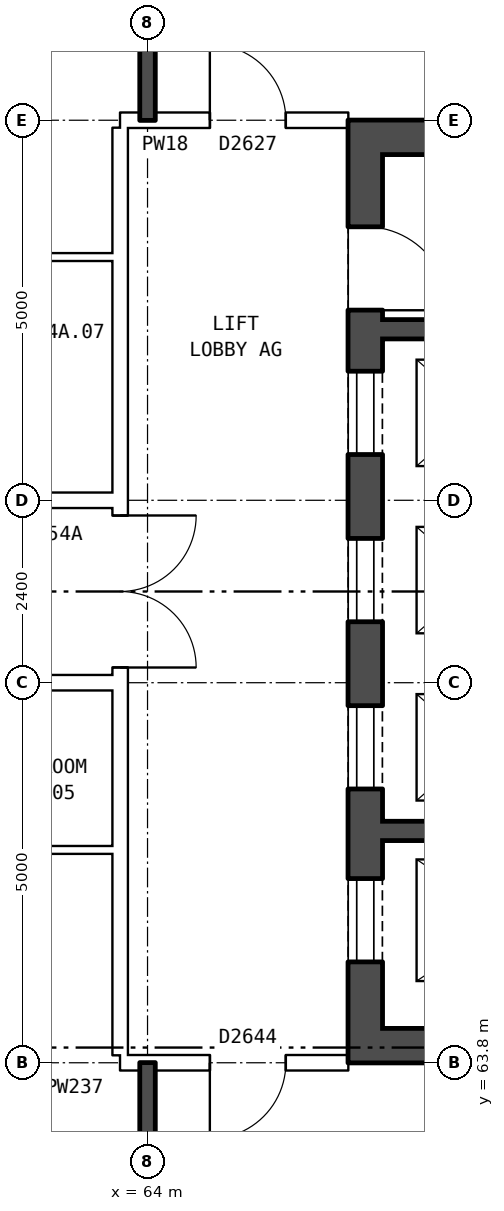
"""IFC4 building model, lengths in metres.
Left out: names, types, materials, properties, quantities, classifications, styles, units other than length and angle.
Written with IfcOpenShell. Run it as: python <this file> out.ifc"""

import sys

from ifc_helpers import new_model, si_unit, direction, frame, frame_2d, origin, place, context, subcontext, project, spatial, rectangle, extrude, element, fill, save


model = new_model("IFC4")
c1 = context("Model", 3, precision=1e-05, world=origin(), true_north=direction((0.0, 1.0)))
c2 = subcontext(c1, "Body", "Model", "MODEL_VIEW")
j1 = project(units=[si_unit("LENGTHUNIT", "METRE"), si_unit("PLANEANGLEUNIT", "RADIAN")], contexts=[c1])
p1 = place(None, origin())
s1 = spatial("IfcSite", under=j1, at=p1, CompositionType="ELEMENT")
p2 = place(p1, origin())
s2 = spatial("IfcBuilding", under=s1, at=p2, CompositionType="ELEMENT")
p3 = place(p2, frame((0.0, 0.0, 191.3)))
s3 = spatial("IfcBuildingStorey", under=s2, at=p3, CompositionType="ELEMENT", Elevation=191.3)
p4 = place(p3, frame((66.865, 63.8, 0.0), z_axis=(0.0, 0.0, 1.0), x_axis=(0.0, 1.0, 0.0)))
e1 = element("IfcWall", 1, at=p4, inside=s3, PredefinedType="SHEAR", context=c2, shape_type="SweptSolid", body=[
    extrude(rectangle(XDim=12.4, YDim=0.45, at=frame_2d((6.2, 0.0))), origin(), (0.0, 0.0, 1.0), 2.85),
])
p5 = place(p4, frame((1.325, 0.0, 0.0)))
e2 = element("IfcOpeningElement", 2, at=p5, cuts=e1, PredefinedType="OPENING", context=c2, shape_type="SweptSolid", body=[
    extrude(rectangle(XDim=1.1, YDim=2.1, at=frame_2d((0.55, 1.05))), frame((0.0, 0.235, 0.0), z_axis=(0.0, -1.0, 0.0), x_axis=(1.0, 0.0, 0.0)), (0.0, 0.0, 1.0), 0.47),
])
p6 = place(p4, frame((3.6, 0.0, 0.0)))
e3 = element("IfcOpeningElement", 3, at=p6, cuts=e1, PredefinedType="OPENING", context=c2, shape_type="SweptSolid", body=[
    extrude(rectangle(XDim=1.1, YDim=2.1, at=frame_2d((0.55, 1.05))), frame((0.0, 0.235, 0.0), z_axis=(0.0, -1.0, 0.0), x_axis=(1.0, 0.0, 0.0)), (0.0, 0.0, 1.0), 0.47),
])
p7 = place(p4, frame((5.8, 0.0, 0.0)))
e4 = element("IfcOpeningElement", 4, at=p7, cuts=e1, PredefinedType="OPENING", context=c2, shape_type="SweptSolid", body=[
    extrude(rectangle(XDim=1.1, YDim=2.1, at=frame_2d((0.55, 1.05))), frame((0.0, 0.235, 0.0), z_axis=(0.0, -1.0, 0.0), x_axis=(1.0, 0.0, 0.0)), (0.0, 0.0, 1.0), 0.47),
])
p8 = place(p4, frame((8.0, 0.0, 0.0)))
e5 = element("IfcOpeningElement", 5, at=p8, cuts=e1, PredefinedType="OPENING", context=c2, shape_type="SweptSolid", body=[
    extrude(rectangle(XDim=1.1, YDim=2.1, at=frame_2d((0.55, 1.05))), frame((0.0, 0.235, 0.0), z_axis=(0.0, -1.0, 0.0), x_axis=(1.0, 0.0, 0.0)), (0.0, 0.0, 1.0), 0.47),
])
p9 = place(p4, frame((9.9, 0.0, 0.0)))
e6 = element("IfcOpeningElement", 6, at=p9, cuts=e1, PredefinedType="OPENING", context=c2, shape_type="SweptSolid", body=[
    extrude(rectangle(XDim=1.1, YDim=2.1, at=frame_2d((0.55, 1.05))), frame((0.0, 0.235, 0.0), z_axis=(0.0, -1.0, 0.0), x_axis=(1.0, 0.0, 0.0)), (0.0, 0.0, 1.0), 0.47),
])
for number, where, z_axis, x_axis in (
    (7, (67.09, 64.025, 0.0), (0.0, 0.0, 1.0), (1.0, 0.0, 0.0)),
    (8, (67.09, 75.975, 0.0), (0.0, 0.0, 1.0), (1.0, 0.0, 0.0)),
):
    element("IfcWall", number, at=place(p3, frame(where, z_axis=z_axis, x_axis=x_axis)), inside=s3, PredefinedType="SHEAR", context=c2, shape_type="SweptSolid", body=[
        extrude(rectangle(XDim=8.1, YDim=0.45, at=frame_2d((4.05, 0.0))), origin(), (0.0, 0.0, 1.0), 2.85),
    ])
p10 = place(p3, frame((67.09, 66.85, 0.0), z_axis=(0.0, 0.0, 1.0), x_axis=(1.0, 0.0, 0.0)))
e9 = element("IfcWall", 9, at=p10, inside=s3, PredefinedType="SHEAR", context=c2, shape_type="SweptSolid", body=[
    extrude(rectangle(XDim=3.545, YDim=0.25, at=frame_2d((1.772, 0.0))), origin(), (0.0, 0.0, 1.0), 2.85),
])
p11 = place(p3, frame((67.09, 73.45, 0.0), z_axis=(0.0, 0.0, 1.0), x_axis=(1.0, 0.0, 0.0)))
e10 = element("IfcWall", 10, at=p11, inside=s3, PredefinedType="SHEAR", context=c2, shape_type="SweptSolid", body=[
    extrude(rectangle(XDim=2.475, YDim=0.25, at=frame_2d((1.237, 0.0))), origin(), (0.0, 0.0, 1.0), 2.85),
])
p12 = place(p3, frame((63.64, 63.9, 0.0), z_axis=(0.0, 0.0, 1.0), x_axis=(0.0, 1.0, 0.0)))
e11 = element("IfcWall", 11, at=p12, inside=s3, PredefinedType="PARTITIONING", context=c2, shape_type="SweptSolid", body=[
    extrude(rectangle(XDim=12.2, YDim=0.2, at=frame_2d((6.1, 0.0))), origin(), (0.0, 0.0, 1.0), 2.85),
])
p13 = place(p12, frame((5.1, 0.0, 0.0)))
e12 = element("IfcOpeningElement", 12, at=p13, cuts=e11, PredefinedType="OPENING", context=c2, shape_type="SweptSolid", body=[
    extrude(rectangle(XDim=2.0, YDim=2.1, at=frame_2d((1.0, 1.05))), frame((0.0, 0.11, 0.0), z_axis=(0.0, -1.0, 0.0), x_axis=(1.0, 0.0, 0.0)), (0.0, 0.0, 1.0), 0.22),
])
p14 = place(p3, frame((63.64, 63.8, 0.0), z_axis=(0.0, 0.0, 1.0), x_axis=(1.0, 0.0, 0.0)))
e13 = element("IfcWall", 13, at=p14, inside=s3, PredefinedType="PARTITIONING", context=c2, shape_type="SweptSolid", body=[
    extrude(rectangle(XDim=3.0, YDim=0.2, at=frame_2d((1.5, 0.0))), origin(), (0.0, 0.0, 1.0), 2.85),
])
p15 = place(p14, frame((1.18, 0.0, 0.0)))
e14 = element("IfcOpeningElement", 14, at=p15, cuts=e13, PredefinedType="OPENING", context=c2, shape_type="SweptSolid", body=[
    extrude(rectangle(XDim=1.0, YDim=2.1, at=frame_2d((0.5, 1.05))), frame((0.0, 0.11, 0.0), z_axis=(0.0, -1.0, 0.0), x_axis=(1.0, 0.0, 0.0)), (0.0, 0.0, 1.0), 0.22),
])
p16 = place(p3, frame((61.0, 66.6, 0.0), z_axis=(0.0, 0.0, 1.0), x_axis=(1.0, 0.0, 0.0)))
e15 = element("IfcWall", 15, at=p16, inside=s3, PredefinedType="PARTITIONING", context=c2, shape_type="SweptSolid", body=[
    extrude(rectangle(XDim=2.64, YDim=0.1, at=frame_2d((1.32, 0.0))), origin(), (0.0, 0.0, 1.0), 2.85),
])
p17 = place(p3, frame((44.36, 68.8, 0.0), z_axis=(0.0, 0.0, 1.0), x_axis=(1.0, 0.0, 0.0)))
e16 = element("IfcWall", 16, at=p17, inside=s3, PredefinedType="PARTITIONING", context=c2, shape_type="SweptSolid", body=[
    extrude(rectangle(XDim=19.28, YDim=0.2, at=frame_2d((9.64, 0.0))), origin(), (0.0, 0.0, 1.0), 2.85),
])
p18 = place(p17, frame((14.64, 0.0, 0.0)))
e17 = element("IfcOpeningElement", 17, at=p18, cuts=e16, PredefinedType="OPENING", context=c2, shape_type="SweptSolid", body=[
    extrude(rectangle(XDim=1.0, YDim=2.1, at=frame_2d((0.5, 1.05))), frame((0.0, 0.11, 0.0), z_axis=(0.0, -1.0, 0.0), x_axis=(1.0, 0.0, 0.0)), (0.0, 0.0, 1.0), 0.22),
])
p19 = place(p17, frame((5.64, 0.0, 0.0)))
e18 = element("IfcOpeningElement", 18, at=p19, cuts=e16, PredefinedType="OPENING", context=c2, shape_type="SweptSolid", body=[
    extrude(rectangle(XDim=1.0, YDim=2.1, at=frame_2d((0.5, 1.05))), frame((0.0, 0.11, 0.0), z_axis=(0.0, -1.0, 0.0), x_axis=(1.0, 0.0, 0.0)), (0.0, 0.0, 1.0), 0.22),
])
p20 = place(p3, frame((44.36, 71.2, 0.0), z_axis=(0.0, 0.0, 1.0), x_axis=(1.0, 0.0, 0.0)))
e19 = element("IfcWall", 19, at=p20, inside=s3, PredefinedType="PARTITIONING", context=c2, shape_type="SweptSolid", body=[
    extrude(rectangle(XDim=19.28, YDim=0.2, at=frame_2d((9.64, 0.0))), origin(), (0.0, 0.0, 1.0), 2.85),
])
p21 = place(p20, frame((14.64, 0.0, 0.0)))
e20 = element("IfcOpeningElement", 20, at=p21, cuts=e19, PredefinedType="OPENING", context=c2, shape_type="SweptSolid", body=[
    extrude(rectangle(XDim=1.0, YDim=2.1, at=frame_2d((0.5, 1.05))), frame((0.0, 0.11, 0.0), z_axis=(0.0, -1.0, 0.0), x_axis=(1.0, 0.0, 0.0)), (0.0, 0.0, 1.0), 0.22),
])
p22 = place(p20, frame((5.64, 0.0, 0.0)))
e21 = element("IfcOpeningElement", 21, at=p22, cuts=e19, PredefinedType="OPENING", context=c2, shape_type="SweptSolid", body=[
    extrude(rectangle(XDim=1.0, YDim=2.1, at=frame_2d((0.5, 1.05))), frame((0.0, 0.11, 0.0), z_axis=(0.0, -1.0, 0.0), x_axis=(1.0, 0.0, 0.0)), (0.0, 0.0, 1.0), 0.22),
])
p23 = place(p3, frame((61.0, 74.4, 0.0), z_axis=(0.0, 0.0, 1.0), x_axis=(1.0, 0.0, 0.0)))
e22 = element("IfcWall", 22, at=p23, inside=s3, PredefinedType="PARTITIONING", context=c2, shape_type="SweptSolid", body=[
    extrude(rectangle(XDim=2.64, YDim=0.1, at=frame_2d((1.32, 0.0))), origin(), (0.0, 0.0, 1.0), 2.85),
])
p24 = place(p3, frame((63.64, 76.2, 0.0), z_axis=(0.0, 0.0, 1.0), x_axis=(1.0, 0.0, 0.0)))
e23 = element("IfcWall", 23, at=p24, inside=s3, PredefinedType="PARTITIONING", context=c2, shape_type="SweptSolid", body=[
    extrude(rectangle(XDim=3.0, YDim=0.2, at=frame_2d((1.5, 0.0))), origin(), (0.0, 0.0, 1.0), 2.85),
])
p25 = place(p24, frame((1.18, 0.0, 0.0)))
e24 = element("IfcOpeningElement", 24, at=p25, cuts=e23, PredefinedType="OPENING", context=c2, shape_type="SweptSolid", body=[
    extrude(rectangle(XDim=1.0, YDim=2.1, at=frame_2d((0.5, 1.05))), frame((0.0, 0.11, 0.0), z_axis=(0.0, -1.0, 0.0), x_axis=(1.0, 0.0, 0.0)), (0.0, 0.0, 1.0), 0.22),
])
for number, where, z_axis, x_axis in (
    (25, (64.0, 54.36, 0.0), (0.0, 0.0, 1.0), (0.0, 1.0, 0.0)),
    (26, (64.0, 76.2, 0.0), (0.0, 0.0, 1.0), (0.0, 1.0, 0.0)),
):
    element("IfcWall", number, at=place(p3, frame(where, z_axis=z_axis, x_axis=x_axis)), inside=s3, PredefinedType="SOLIDWALL", context=c2, shape_type="SweptSolid", body=[
        extrude(rectangle(XDim=9.44, YDim=0.2, at=frame_2d((4.72, 0.0))), origin(), (0.0, 0.0, 1.0), 2.85),
    ])
p26 = place(p5, origin())
e27 = element("IfcDoor", 27, at=p26, inside=s3, OperationType="DOUBLE_DOOR_SLIDING", PredefinedType="DOOR", context=c2, shape_type="SweptSolid", body=[
    extrude(rectangle(XDim=1.1, YDim=2.1, at=frame_2d((0.55, 1.05))), frame((0.0, -0.16, 0.0), z_axis=(0.0, -1.0, 0.0), x_axis=(1.0, 0.0, 0.0)), (0.0, 0.0, 1.0), 0.05),
])
fill(e2, e27)
p27 = place(p6, origin())
e28 = element("IfcDoor", 28, at=p27, inside=s3, OperationType="DOUBLE_DOOR_SLIDING", PredefinedType="DOOR", context=c2, shape_type="SweptSolid", body=[
    extrude(rectangle(XDim=1.1, YDim=2.1, at=frame_2d((0.55, 1.05))), frame((0.0, -0.16, 0.0), z_axis=(0.0, -1.0, 0.0), x_axis=(1.0, 0.0, 0.0)), (0.0, 0.0, 1.0), 0.05),
])
fill(e3, e28)
p28 = place(p7, origin())
e29 = element("IfcDoor", 29, at=p28, inside=s3, OperationType="DOUBLE_DOOR_SLIDING", PredefinedType="DOOR", context=c2, shape_type="SweptSolid", body=[
    extrude(rectangle(XDim=1.1, YDim=2.1, at=frame_2d((0.55, 1.05))), frame((0.0, -0.16, 0.0), z_axis=(0.0, -1.0, 0.0), x_axis=(1.0, 0.0, 0.0)), (0.0, 0.0, 1.0), 0.05),
])
fill(e4, e29)
p29 = place(p8, origin())
e30 = element("IfcDoor", 30, at=p29, inside=s3, OperationType="DOUBLE_DOOR_SLIDING", PredefinedType="DOOR", context=c2, shape_type="SweptSolid", body=[
    extrude(rectangle(XDim=1.1, YDim=2.1, at=frame_2d((0.55, 1.05))), frame((0.0, -0.16, 0.0), z_axis=(0.0, -1.0, 0.0), x_axis=(1.0, 0.0, 0.0)), (0.0, 0.0, 1.0), 0.05),
])
fill(e5, e30)
p30 = place(p9, frame((1.1, 0.0, 0.0), z_axis=(0.0, 0.0, 1.0), x_axis=(-1.0, 0.0, 0.0)))
e31 = element("IfcDoor", 31, at=p30, inside=s3, OperationType="SINGLE_SWING_RIGHT", PredefinedType="DOOR", context=c2, shape_type="SweptSolid", body=[
    extrude(rectangle(XDim=1.1, YDim=2.1, at=frame_2d((0.55, 1.05))), frame((0.0, 0.21, 0.0), z_axis=(0.0, -1.0, 0.0), x_axis=(1.0, 0.0, 0.0)), (0.0, 0.0, 1.0), 0.05),
])
fill(e6, e31)
p31 = place(p13, frame((2.0, 0.0, 0.0), z_axis=(0.0, 0.0, 1.0), x_axis=(-1.0, 0.0, 0.0)))
e32 = element("IfcDoor", 32, at=p31, inside=s3, OperationType="DOUBLE_DOOR_SINGLE_SWING", PredefinedType="DOOR", context=c2, shape_type="SweptSolid", body=[
    extrude(rectangle(XDim=2.0, YDim=2.1, at=frame_2d((1.0, 1.05))), frame((0.0, 0.025, 0.0), z_axis=(0.0, -1.0, 0.0), x_axis=(1.0, 0.0, 0.0)), (0.0, 0.0, 1.0), 0.05),
])
fill(e12, e32)
p32 = place(p15, frame((1.0, 0.0, 0.0), z_axis=(0.0, 0.0, 1.0), x_axis=(-1.0, 0.0, 0.0)))
e33 = element("IfcDoor", 33, at=p32, inside=s3, OperationType="SINGLE_SWING_RIGHT", PredefinedType="DOOR", context=c2, shape_type="SweptSolid", body=[
    extrude(rectangle(XDim=1.0, YDim=2.1, at=frame_2d((0.5, 1.05))), frame((0.0, 0.025, 0.0), z_axis=(0.0, -1.0, 0.0), x_axis=(1.0, 0.0, 0.0)), (0.0, 0.0, 1.0), 0.05),
])
fill(e14, e33)
p33 = place(p25, origin())
e34 = element("IfcDoor", 34, at=p33, inside=s3, OperationType="SINGLE_SWING_LEFT", PredefinedType="DOOR", context=c2, shape_type="SweptSolid", body=[
    extrude(rectangle(XDim=1.0, YDim=2.1, at=frame_2d((0.5, 1.05))), frame((0.0, 0.025, 0.0), z_axis=(0.0, -1.0, 0.0), x_axis=(1.0, 0.0, 0.0)), (0.0, 0.0, 1.0), 0.05),
])
fill(e24, e34)
save(model, sys.argv[1])
